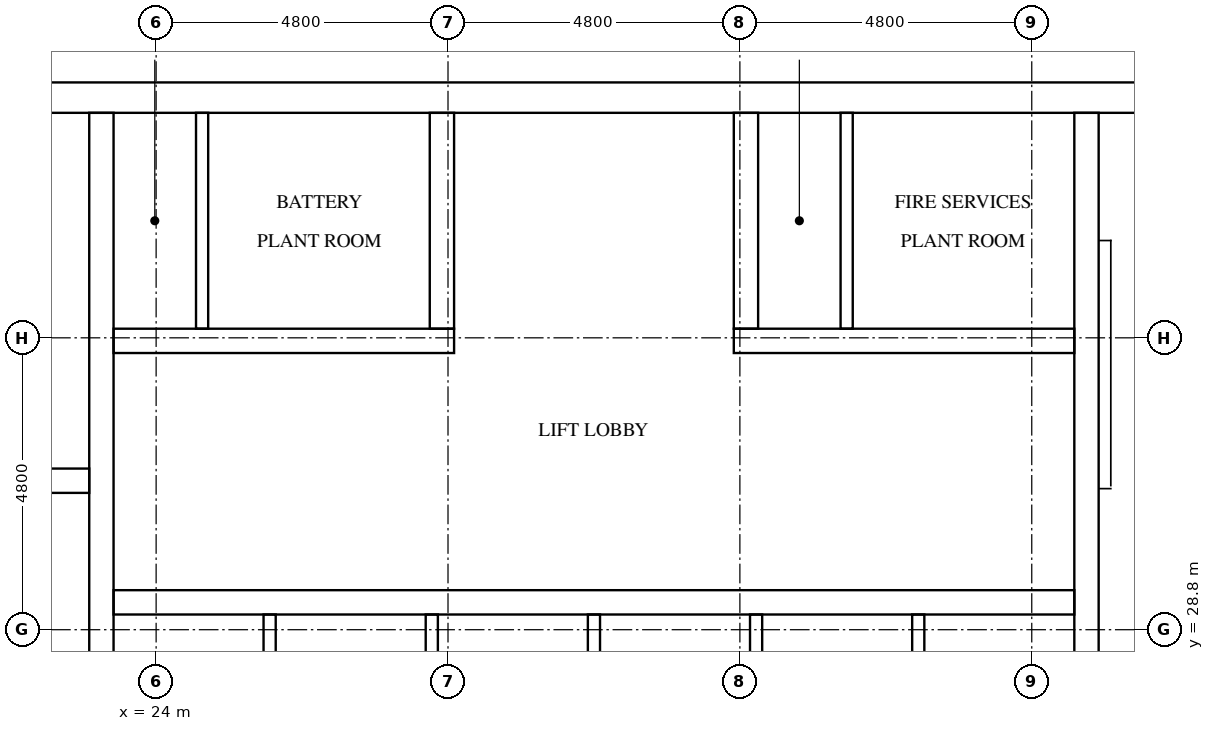
"""IFC4 building model, lengths in metres.
Left out: names, types, materials, properties, quantities, classifications, styles, units other than length and angle.
Written with IfcOpenShell. Run it as: python <this file> out.ifc"""

import sys

from ifc_helpers import new_model, si_unit, direction, frame, frame_2d, origin, place, context, subcontext, project, spatial, rectangle, extrude, element, fill, save


model = new_model("IFC4")
c1 = context("Model", 3, precision=1e-05, world=origin(), true_north=direction((0.0, 1.0)))
c2 = subcontext(c1, "Body", "Model", "MODEL_VIEW")
j1 = project(units=[si_unit("LENGTHUNIT", "METRE"), si_unit("PLANEANGLEUNIT", "RADIAN")], contexts=[c1])
p1 = place(None, origin())
s1 = spatial("IfcSite", under=j1, at=p1, CompositionType="ELEMENT")
p2 = place(p1, origin())
s2 = spatial("IfcBuilding", under=s1, at=p2, CompositionType="ELEMENT")
p3 = place(p2, frame((0.0, 0.0, 291.5)))
s3 = spatial("IfcBuildingStorey", under=s2, at=p3, CompositionType="ELEMENT", Elevation=291.5)
p4 = place(p3, frame((15.0, 37.55, 0.0), z_axis=(0.0, 0.0, 1.0), x_axis=(1.0, 0.0, 0.0)))
e1 = element("IfcWall", 1, at=p4, inside=s3, PredefinedType="SHEAR", context=c2, shape_type="SweptSolid", body=[
    extrude(rectangle(XDim=32.4, YDim=0.5, at=frame_2d((16.2, 0.0))), origin(), (0.0, 0.0, 1.0), 4.4),
])
p5 = place(p4, frame((15.3, 0.0, 0.0)))
e2 = element("IfcOpeningElement", 2, at=p5, cuts=e1, PredefinedType="OPENING", context=c2, shape_type="SweptSolid", body=[
    extrude(rectangle(XDim=1.8, YDim=2.1, at=frame_2d((0.9, 1.05))), frame((0.0, 0.26, 0.0), z_axis=(0.0, -1.0, 0.0), x_axis=(1.0, 0.0, 0.0)), (0.0, 0.0, 1.0), 0.52),
])
p6 = place(p4, frame((1.282, 0.0, 0.0)))
e3 = element("IfcOpeningElement", 3, at=p6, cuts=e1, PredefinedType="OPENING", context=c2, shape_type="SweptSolid", body=[
    extrude(rectangle(XDim=1.0, YDim=2.1, at=frame_2d((0.5, 1.05))), frame((0.0, 0.26, 0.0), z_axis=(0.0, -1.0, 0.0), x_axis=(1.0, 0.0, 0.0)), (0.0, 0.0, 1.0), 0.52),
])
p7 = place(p4, frame((5.082, 0.0, 0.0)))
e4 = element("IfcOpeningElement", 4, at=p7, cuts=e1, PredefinedType="OPENING", context=c2, shape_type="SweptSolid", body=[
    extrude(rectangle(XDim=1.0, YDim=2.1, at=frame_2d((0.5, 1.05))), frame((0.0, 0.26, 0.0), z_axis=(0.0, -1.0, 0.0), x_axis=(1.0, 0.0, 0.0)), (0.0, 0.0, 1.0), 0.52),
])
p8 = place(p3, frame((23.1, 15.5, 0.0), z_axis=(0.0, 0.0, 1.0), x_axis=(0.0, 1.0, 0.0)))
e5 = element("IfcWall", 5, at=p8, inside=s3, PredefinedType="SHEAR", context=c2, shape_type="SweptSolid", body=[
    extrude(rectangle(XDim=21.8, YDim=0.4, at=frame_2d((10.9, 0.0))), origin(), (0.0, 0.0, 1.0), 4.4),
])
p9 = place(p3, frame((39.3, 27.75, 0.0), z_axis=(0.0, 0.0, 1.0), x_axis=(0.0, 1.0, 0.0)))
e6 = element("IfcWall", 6, at=p9, inside=s3, PredefinedType="SHEAR", context=c2, shape_type="SweptSolid", body=[
    extrude(rectangle(XDim=9.55, YDim=0.4, at=frame_2d((4.775, 0.0))), origin(), (0.0, 0.0, 1.0), 4.4),
])
p10 = place(p3, frame((15.5, 31.25, 0.0), z_axis=(0.0, 0.0, 1.0), x_axis=(1.0, 0.0, 0.0)))
e7 = element("IfcWall", 7, at=p10, inside=s3, PredefinedType="SHEAR", context=c2, shape_type="SweptSolid", body=[
    extrude(rectangle(XDim=7.4, YDim=0.4, at=frame_2d((3.7, 0.0))), origin(), (0.0, 0.0, 1.0), 4.4),
])
p11 = place(p3, frame((23.3, 29.25, 0.0), z_axis=(0.0, 0.0, 1.0), x_axis=(1.0, 0.0, 0.0)))
e8 = element("IfcWall", 8, at=p11, inside=s3, PredefinedType="SHEAR", context=c2, shape_type="SweptSolid", body=[
    extrude(rectangle(XDim=15.8, YDim=0.4, at=frame_2d((7.9, 0.0))), origin(), (0.0, 0.0, 1.0), 4.4),
])
p12 = place(p11, frame((0.683, 0.0, 0.0)))
e9 = element("IfcOpeningElement", 9, at=p12, cuts=e8, PredefinedType="OPENING", context=c2, shape_type="SweptSolid", body=[
    extrude(rectangle(XDim=1.1, YDim=2.1, at=frame_2d((0.55, 1.05))), frame((0.0, 0.21, 0.0), z_axis=(0.0, -1.0, 0.0), x_axis=(1.0, 0.0, 0.0)), (0.0, 0.0, 1.0), 0.42),
])
p13 = place(p11, frame((3.35, 0.0, 0.0)))
e10 = element("IfcOpeningElement", 10, at=p13, cuts=e8, PredefinedType="OPENING", context=c2, shape_type="SweptSolid", body=[
    extrude(rectangle(XDim=1.1, YDim=2.1, at=frame_2d((0.55, 1.05))), frame((0.0, 0.21, 0.0), z_axis=(0.0, -1.0, 0.0), x_axis=(1.0, 0.0, 0.0)), (0.0, 0.0, 1.0), 0.42),
])
p14 = place(p11, frame((6.017, 0.0, 0.0)))
e11 = element("IfcOpeningElement", 11, at=p14, cuts=e8, PredefinedType="OPENING", context=c2, shape_type="SweptSolid", body=[
    extrude(rectangle(XDim=1.1, YDim=2.1, at=frame_2d((0.55, 1.05))), frame((0.0, 0.21, 0.0), z_axis=(0.0, -1.0, 0.0), x_axis=(1.0, 0.0, 0.0)), (0.0, 0.0, 1.0), 0.42),
])
p15 = place(p11, frame((8.683, 0.0, 0.0)))
e12 = element("IfcOpeningElement", 12, at=p15, cuts=e8, PredefinedType="OPENING", context=c2, shape_type="SweptSolid", body=[
    extrude(rectangle(XDim=1.1, YDim=2.1, at=frame_2d((0.55, 1.05))), frame((0.0, 0.21, 0.0), z_axis=(0.0, -1.0, 0.0), x_axis=(1.0, 0.0, 0.0)), (0.0, 0.0, 1.0), 0.42),
])
p16 = place(p11, frame((11.35, 0.0, 0.0)))
e13 = element("IfcOpeningElement", 13, at=p16, cuts=e8, PredefinedType="OPENING", context=c2, shape_type="SweptSolid", body=[
    extrude(rectangle(XDim=1.1, YDim=2.1, at=frame_2d((0.55, 1.05))), frame((0.0, 0.21, 0.0), z_axis=(0.0, -1.0, 0.0), x_axis=(1.0, 0.0, 0.0)), (0.0, 0.0, 1.0), 0.42),
])
p17 = place(p11, frame((14.017, 0.0, 0.0)))
e14 = element("IfcOpeningElement", 14, at=p17, cuts=e8, PredefinedType="OPENING", context=c2, shape_type="SweptSolid", body=[
    extrude(rectangle(XDim=1.1, YDim=2.1, at=frame_2d((0.55, 1.05))), frame((0.0, 0.21, 0.0), z_axis=(0.0, -1.0, 0.0), x_axis=(1.0, 0.0, 0.0)), (0.0, 0.0, 1.0), 0.42),
])
p18 = place(p3, frame((23.3, 33.55, 0.0), z_axis=(0.0, 0.0, 1.0), x_axis=(1.0, 0.0, 0.0)))
e15 = element("IfcWall", 15, at=p18, inside=s3, PredefinedType="SHEAR", context=c2, shape_type="SweptSolid", body=[
    extrude(rectangle(XDim=5.6, YDim=0.4, at=frame_2d((2.8, 0.0))), origin(), (0.0, 0.0, 1.0), 4.4),
])
p19 = place(p18, frame((0.178, 0.0, 0.0)))
e16 = element("IfcOpeningElement", 16, at=p19, cuts=e15, PredefinedType="OPENING", context=c2, shape_type="SweptSolid", body=[
    extrude(rectangle(XDim=1.0, YDim=2.1, at=frame_2d((0.5, 1.05))), frame((0.0, 0.21, 0.0), z_axis=(0.0, -1.0, 0.0), x_axis=(1.0, 0.0, 0.0)), (0.0, 0.0, 1.0), 0.42),
])
p20 = place(p18, frame((2.878, 0.0, 0.0)))
e17 = element("IfcOpeningElement", 17, at=p20, cuts=e15, PredefinedType="OPENING", context=c2, shape_type="SweptSolid", body=[
    extrude(rectangle(XDim=1.0, YDim=2.1, at=frame_2d((0.5, 1.05))), frame((0.0, 0.21, 0.0), z_axis=(0.0, -1.0, 0.0), x_axis=(1.0, 0.0, 0.0)), (0.0, 0.0, 1.0), 0.42),
])
p21 = place(p3, frame((33.5, 33.55, 0.0), z_axis=(0.0, 0.0, 1.0), x_axis=(1.0, 0.0, 0.0)))
e18 = element("IfcWall", 18, at=p21, inside=s3, PredefinedType="SHEAR", context=c2, shape_type="SweptSolid", body=[
    extrude(rectangle(XDim=5.6, YDim=0.4, at=frame_2d((2.8, 0.0))), origin(), (0.0, 0.0, 1.0), 4.4),
])
p22 = place(p21, frame((0.578, 0.0, 0.0)))
e19 = element("IfcOpeningElement", 19, at=p22, cuts=e18, PredefinedType="OPENING", context=c2, shape_type="SweptSolid", body=[
    extrude(rectangle(XDim=1.0, YDim=2.1, at=frame_2d((0.5, 1.05))), frame((0.0, 0.21, 0.0), z_axis=(0.0, -1.0, 0.0), x_axis=(1.0, 0.0, 0.0)), (0.0, 0.0, 1.0), 0.42),
])
p23 = place(p21, frame((3.278, 0.0, 0.0)))
e20 = element("IfcOpeningElement", 20, at=p23, cuts=e18, PredefinedType="OPENING", context=c2, shape_type="SweptSolid", body=[
    extrude(rectangle(XDim=1.0, YDim=2.1, at=frame_2d((0.5, 1.05))), frame((0.0, 0.21, 0.0), z_axis=(0.0, -1.0, 0.0), x_axis=(1.0, 0.0, 0.0)), (0.0, 0.0, 1.0), 0.42),
])
for number, where, z_axis, x_axis in (
    (21, (28.7, 33.75, 0.0), (0.0, 0.0, 1.0), (0.0, 1.0, 0.0)),
    (22, (33.7, 33.75, 0.0), (0.0, 0.0, 1.0), (0.0, 1.0, 0.0)),
):
    element("IfcWall", number, at=place(p3, frame(where, z_axis=z_axis, x_axis=x_axis)), inside=s3, PredefinedType="SHEAR", context=c2, shape_type="SweptSolid", body=[
        extrude(rectangle(XDim=3.55, YDim=0.4, at=frame_2d((1.775, 0.0))), origin(), (0.0, 0.0, 1.0), 4.4),
    ])
for number, where, z_axis, x_axis in (
    (23, (25.867, 26.35, 0.0), (0.0, 0.0, 1.0), (0.0, 1.0, 0.0)),
    (24, (28.533, 26.35, 0.0), (0.0, 0.0, 1.0), (0.0, 1.0, 0.0)),
    (25, (31.2, 26.35, 0.0), (0.0, 0.0, 1.0), (0.0, 1.0, 0.0)),
    (26, (33.867, 26.35, 0.0), (0.0, 0.0, 1.0), (0.0, 1.0, 0.0)),
    (27, (36.533, 26.35, 0.0), (0.0, 0.0, 1.0), (0.0, 1.0, 0.0)),
):
    element("IfcWall", number, at=place(p3, frame(where, z_axis=z_axis, x_axis=x_axis)), inside=s3, PredefinedType="SOLIDWALL", context=c2, shape_type="SweptSolid", body=[
        extrude(rectangle(XDim=2.7, YDim=0.2, at=frame_2d((1.35, 0.0))), origin(), (0.0, 0.0, 1.0), 4.4),
    ])
for number, where, z_axis, x_axis in (
    (28, (24.756, 33.75, 0.0), (0.0, 0.0, 1.0), (0.0, 1.0, 0.0)),
    (29, (35.356, 33.75, 0.0), (0.0, 0.0, 1.0), (0.0, 1.0, 0.0)),
):
    element("IfcWall", number, at=place(p3, frame(where, z_axis=z_axis, x_axis=x_axis)), inside=s3, PredefinedType="PARTITIONING", context=c2, shape_type="SweptSolid", body=[
        extrude(rectangle(XDim=3.55, YDim=0.2, at=frame_2d((1.775, 0.0))), origin(), (0.0, 0.0, 1.0), 4.4),
    ])
p24 = place(p12, origin())
e30 = element("IfcDoor", 30, at=p24, inside=s3, OperationType="DOUBLE_DOOR_SLIDING", PredefinedType="DOOR", context=c2, shape_type="SweptSolid", body=[
    extrude(rectangle(XDim=1.1, YDim=2.1, at=frame_2d((0.55, 1.05))), frame((0.0, 0.025, 0.0), z_axis=(0.0, -1.0, 0.0), x_axis=(1.0, 0.0, 0.0)), (0.0, 0.0, 1.0), 0.05),
])
fill(e9, e30)
p25 = place(p13, origin())
e31 = element("IfcDoor", 31, at=p25, inside=s3, OperationType="DOUBLE_DOOR_SLIDING", PredefinedType="DOOR", context=c2, shape_type="SweptSolid", body=[
    extrude(rectangle(XDim=1.1, YDim=2.1, at=frame_2d((0.55, 1.05))), frame((0.0, 0.025, 0.0), z_axis=(0.0, -1.0, 0.0), x_axis=(1.0, 0.0, 0.0)), (0.0, 0.0, 1.0), 0.05),
])
fill(e10, e31)
p26 = place(p14, origin())
e32 = element("IfcDoor", 32, at=p26, inside=s3, OperationType="DOUBLE_DOOR_SLIDING", PredefinedType="DOOR", context=c2, shape_type="SweptSolid", body=[
    extrude(rectangle(XDim=1.1, YDim=2.1, at=frame_2d((0.55, 1.05))), frame((0.0, 0.025, 0.0), z_axis=(0.0, -1.0, 0.0), x_axis=(1.0, 0.0, 0.0)), (0.0, 0.0, 1.0), 0.05),
])
fill(e11, e32)
p27 = place(p15, origin())
e33 = element("IfcDoor", 33, at=p27, inside=s3, OperationType="DOUBLE_DOOR_SLIDING", PredefinedType="DOOR", context=c2, shape_type="SweptSolid", body=[
    extrude(rectangle(XDim=1.1, YDim=2.1, at=frame_2d((0.55, 1.05))), frame((0.0, 0.025, 0.0), z_axis=(0.0, -1.0, 0.0), x_axis=(1.0, 0.0, 0.0)), (0.0, 0.0, 1.0), 0.05),
])
fill(e12, e33)
p28 = place(p16, origin())
e34 = element("IfcDoor", 34, at=p28, inside=s3, OperationType="DOUBLE_DOOR_SLIDING", PredefinedType="DOOR", context=c2, shape_type="SweptSolid", body=[
    extrude(rectangle(XDim=1.1, YDim=2.1, at=frame_2d((0.55, 1.05))), frame((0.0, 0.025, 0.0), z_axis=(0.0, -1.0, 0.0), x_axis=(1.0, 0.0, 0.0)), (0.0, 0.0, 1.0), 0.05),
])
fill(e13, e34)
p29 = place(p17, origin())
e35 = element("IfcDoor", 35, at=p29, inside=s3, OperationType="DOUBLE_DOOR_SLIDING", PredefinedType="DOOR", context=c2, shape_type="SweptSolid", body=[
    extrude(rectangle(XDim=1.1, YDim=2.1, at=frame_2d((0.55, 1.05))), frame((0.0, 0.025, 0.0), z_axis=(0.0, -1.0, 0.0), x_axis=(1.0, 0.0, 0.0)), (0.0, 0.0, 1.0), 0.05),
])
fill(e14, e35)
p30 = place(p5, origin())
e36 = element("IfcDoor", 36, at=p30, inside=s3, OperationType="DOUBLE_DOOR_SINGLE_SWING", PredefinedType="DOOR", context=c2, shape_type="SweptSolid", body=[
    extrude(rectangle(XDim=1.8, YDim=2.1, at=frame_2d((0.9, 1.05))), frame((0.0, 0.025, 0.0), z_axis=(0.0, -1.0, 0.0), x_axis=(1.0, 0.0, 0.0)), (0.0, 0.0, 1.0), 0.05),
])
fill(e2, e36)
p31 = place(p19, frame((1.0, 0.0, 0.0), z_axis=(0.0, 0.0, 1.0), x_axis=(-1.0, 0.0, 0.0)))
e37 = element("IfcDoor", 37, at=p31, inside=s3, OperationType="SINGLE_SWING_LEFT", PredefinedType="DOOR", context=c2, shape_type="SweptSolid", body=[
    extrude(rectangle(XDim=1.0, YDim=2.1, at=frame_2d((0.5, 1.05))), frame((0.0, 0.025, 0.0), z_axis=(0.0, -1.0, 0.0), x_axis=(1.0, 0.0, 0.0)), (0.0, 0.0, 1.0), 0.05),
])
fill(e16, e37)
p32 = place(p20, frame((1.0, 0.0, 0.0), z_axis=(0.0, 0.0, 1.0), x_axis=(-1.0, 0.0, 0.0)))
e38 = element("IfcDoor", 38, at=p32, inside=s3, OperationType="SINGLE_SWING_RIGHT", PredefinedType="DOOR", context=c2, shape_type="SweptSolid", body=[
    extrude(rectangle(XDim=1.0, YDim=2.1, at=frame_2d((0.5, 1.05))), frame((0.0, 0.025, 0.0), z_axis=(0.0, -1.0, 0.0), x_axis=(1.0, 0.0, 0.0)), (0.0, 0.0, 1.0), 0.05),
])
fill(e17, e38)
p33 = place(p22, frame((1.0, 0.0, 0.0), z_axis=(0.0, 0.0, 1.0), x_axis=(-1.0, 0.0, 0.0)))
e39 = element("IfcDoor", 39, at=p33, inside=s3, OperationType="SINGLE_SWING_LEFT", PredefinedType="DOOR", context=c2, shape_type="SweptSolid", body=[
    extrude(rectangle(XDim=1.0, YDim=2.1, at=frame_2d((0.5, 1.05))), frame((0.0, 0.025, 0.0), z_axis=(0.0, -1.0, 0.0), x_axis=(1.0, 0.0, 0.0)), (0.0, 0.0, 1.0), 0.05),
])
fill(e19, e39)
p34 = place(p23, frame((1.0, 0.0, 0.0), z_axis=(0.0, 0.0, 1.0), x_axis=(-1.0, 0.0, 0.0)))
e40 = element("IfcDoor", 40, at=p34, inside=s3, OperationType="SINGLE_SWING_RIGHT", PredefinedType="DOOR", context=c2, shape_type="SweptSolid", body=[
    extrude(rectangle(XDim=1.0, YDim=2.1, at=frame_2d((0.5, 1.05))), frame((0.0, 0.025, 0.0), z_axis=(0.0, -1.0, 0.0), x_axis=(1.0, 0.0, 0.0)), (0.0, 0.0, 1.0), 0.05),
])
fill(e20, e40)
save(model, sys.argv[1])
